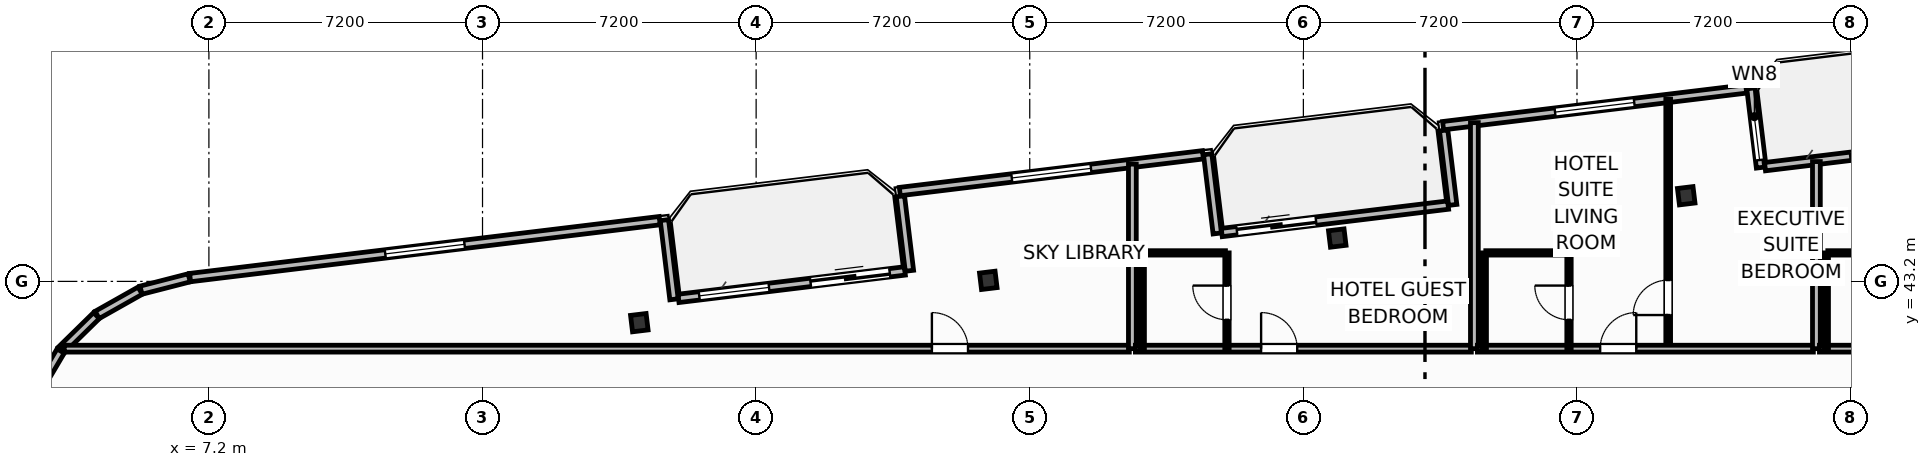
"""IFC4 building model, lengths in metres.
Left out: names, types, materials, properties, quantities, classifications, styles, units other than length and angle.
Written with IfcOpenShell. Run it as: python <this file> out.ifc"""

import sys

from ifc_helpers import new_model, si_unit, direction, frame, frame_2d, origin, origin_2d, place, context, subcontext, project, spatial, rectangle, i_section, extrude, element, fill, save


model = new_model("IFC4")
c1 = context("Model", 3, precision=1e-05, world=origin(), true_north=direction((0.0, 1.0)))
c2 = subcontext(c1, "Body", "Model", "MODEL_VIEW")
j1 = project(units=[si_unit("LENGTHUNIT", "METRE"), si_unit("PLANEANGLEUNIT", "RADIAN")], contexts=[c1])
p1 = place(None, origin())
s1 = spatial("IfcSite", under=j1, at=p1, CompositionType="ELEMENT")
p2 = place(p1, origin())
s2 = spatial("IfcBuilding", under=s1, at=p2, CompositionType="ELEMENT")
p3 = place(p2, frame((0.0, 0.0, 182.0)))
s3 = spatial("IfcBuildingStorey", under=s2, at=p3, CompositionType="ELEMENT", Elevation=182.0)
for number, where, z_axis, x_axis in (
    (1, (46.075, 45.454, 0.0), (0.0, 0.0, 1.0), (0.993, 0.12, 0.0)),
    (2, (36.892, 44.341, 0.0), (0.0, 0.0, 1.0), (0.993, 0.12, 0.0)),
    (3, (27.709, 43.227, 0.0), (0.0, 0.0, 1.0), (0.993, 0.12, 0.0)),
    (4, (18.526, 42.114, 0.0), (0.0, 0.0, 1.0), (0.993, 0.12, 0.0)),
):
    element("IfcColumn", number, at=place(p3, frame(where, z_axis=z_axis, x_axis=x_axis)), inside=s3, PredefinedType="COLUMN", context=c2, shape_type="SweptSolid", body=[
        extrude(i_section(OverallWidth=0.412, OverallDepth=0.435, WebThickness=0.036, FlangeThickness=0.057, FilletRadius=0.025, at=origin_2d()), origin(), (0.0, 0.0, 1.0), 3.7),
    ])
p4 = place(p3, frame((19.557, 42.753, 0.0), z_axis=(0.0, 0.0, 1.0), x_axis=(0.992729951822, 0.120362962556, 0.0)))
e5 = element("IfcWall", 5, at=p4, inside=s3, PredefinedType="SOLIDWALL", context=c2, shape_type="SweptSolid", body=[
    extrude(rectangle(XDim=6.0, YDim=0.22, at=frame_2d((3.0, 0.0))), origin(), (0.0, 0.0, 1.0), 2.73),
])
p5 = place(p4, frame((3.5, 0.0, 0.0)))
e6 = element("IfcOpeningElement", 6, at=p5, cuts=e5, PredefinedType="OPENING", context=c2, shape_type="SweptSolid", body=[
    extrude(rectangle(XDim=2.1, YDim=2.3, at=frame_2d((1.05, 1.15))), frame((0.0, 0.12, 0.0), z_axis=(0.0, -1.0, 0.0), x_axis=(1.0, 0.0, 0.0)), (0.0, 0.0, 1.0), 0.24),
])
p6 = place(p4, frame((0.55, 0.0, 0.75)))
e7 = element("IfcOpeningElement", 7, at=p6, cuts=e5, PredefinedType="OPENING", context=c2, shape_type="SweptSolid", body=[
    extrude(rectangle(XDim=1.85, YDim=1.75, at=frame_2d((0.925, 0.875))), frame((0.0, 0.12, 0.0), z_axis=(0.0, -1.0, 0.0), x_axis=(1.0, 0.0, 0.0)), (0.0, 0.0, 1.0), 0.24),
])
p7 = place(p3, frame((33.852, 44.486, 0.0), z_axis=(0.0, 0.0, 1.0), x_axis=(0.992729951822, 0.120362962556, 0.0)))
e8 = element("IfcWall", 8, at=p7, inside=s3, PredefinedType="SOLIDWALL", context=c2, shape_type="SweptSolid", body=[
    extrude(rectangle(XDim=6.0, YDim=0.22, at=frame_2d((3.0, 0.0))), origin(), (0.0, 0.0, 1.0), 2.73),
])
p8 = place(p7, frame((0.4, 0.0, 0.0)))
e9 = element("IfcOpeningElement", 9, at=p8, cuts=e8, PredefinedType="OPENING", context=c2, shape_type="SweptSolid", body=[
    extrude(rectangle(XDim=2.1, YDim=2.3, at=frame_2d((1.05, 1.15))), frame((0.0, 0.12, 0.0), z_axis=(0.0, -1.0, 0.0), x_axis=(1.0, 0.0, 0.0)), (0.0, 0.0, 1.0), 0.24),
])
p9 = place(p3, frame((48.148, 46.219, 0.0), z_axis=(0.0, 0.0, 1.0), x_axis=(0.992729951822, 0.120362962556, 0.0)))
e10 = element("IfcWall", 10, at=p9, inside=s3, PredefinedType="SOLIDWALL", context=c2, shape_type="SweptSolid", body=[
    extrude(rectangle(XDim=6.0, YDim=0.22, at=frame_2d((3.0, 0.0))), origin(), (0.0, 0.0, 1.0), 2.73),
])
p10 = place(p9, frame((2.26, 0.0, 0.0)))
e11 = element("IfcOpeningElement", 11, at=p10, cuts=e10, PredefinedType="OPENING", context=c2, shape_type="SweptSolid", body=[
    extrude(rectangle(XDim=2.1, YDim=2.3, at=frame_2d((1.05, 1.15))), frame((0.0, 0.12, 0.0), z_axis=(0.0, -1.0, 0.0), x_axis=(1.0, 0.0, 0.0)), (0.0, 0.0, 1.0), 0.24),
])
p11 = place(p3, frame((48.03, 46.194, 0.0), z_axis=(0.0, 0.0, 1.0), x_axis=(-0.120314009587, 0.992735885871, 0.0)))
e12 = element("IfcWall", 12, at=p11, inside=s3, PredefinedType="SOLIDWALL", context=c2, shape_type="SweptSolid", body=[
    extrude(rectangle(XDim=2.1, YDim=0.22, at=frame_2d((1.05, 0.0))), origin(), (0.0, 0.0, 1.0), 2.73),
])
p12 = place(p11, frame((0.2, 0.0, 0.8)))
e13 = element("IfcOpeningElement", 13, at=p12, cuts=e12, PredefinedType="OPENING", context=c2, shape_type="SweptSolid", body=[
    extrude(rectangle(XDim=1.15, YDim=1.4, at=frame_2d((0.575, 0.7))), frame((0.0, 0.12, 0.0), z_axis=(0.0, -1.0, 0.0), x_axis=(1.0, 0.0, 0.0)), (0.0, 0.0, 1.0), 0.24),
])
p13 = place(p3, frame((47.653, 48.264, 0.0), z_axis=(0.0, 0.0, 1.0), x_axis=(-0.992731032022, -0.120354052946, 0.0)))
e14 = element("IfcWall", 14, at=p13, inside=s3, PredefinedType="SOLIDWALL", context=c2, shape_type="SweptSolid", body=[
    extrude(rectangle(XDim=8.035, YDim=0.22, at=frame_2d((4.018, 0.0))), origin(), (0.0, 0.0, 1.0), 2.73),
])
p14 = place(p13, frame((2.968, 0.0, 0.8)))
e15 = element("IfcOpeningElement", 15, at=p14, cuts=e14, PredefinedType="OPENING", context=c2, shape_type="SweptSolid", body=[
    extrude(rectangle(XDim=2.1, YDim=1.75, at=frame_2d((1.05, 0.875))), frame((0.0, 0.12, 0.0), z_axis=(0.0, -1.0, 0.0), x_axis=(1.0, 0.0, 0.0)), (0.0, 0.0, 1.0), 0.24),
])
p15 = place(p3, frame((39.691, 47.173, 0.0), z_axis=(0.0, 0.0, 1.0), x_axis=(0.120397815541, -0.992725725472, 0.0)))
e16 = element("IfcWall", 16, at=p15, inside=s3, PredefinedType="SOLIDWALL", context=c2, shape_type="SweptSolid", body=[
    extrude(rectangle(XDim=1.975, YDim=0.22, at=frame_2d((0.988, 0.0))), origin(), (0.0, 0.0, 1.0), 2.73),
])
p16 = place(p3, frame((33.734, 44.461, 0.0), z_axis=(0.0, 0.0, 1.0), x_axis=(-0.120327895535, 0.992734202874, 0.0)))
e17 = element("IfcWall", 17, at=p16, inside=s3, PredefinedType="SOLIDWALL", context=c2, shape_type="SweptSolid", body=[
    extrude(rectangle(XDim=2.1, YDim=0.22, at=frame_2d((1.05, 0.0))), origin(), (0.0, 0.0, 1.0), 2.73),
])
p17 = place(p3, frame((33.357, 46.531, 0.0), z_axis=(0.0, 0.0, 1.0), x_axis=(-0.992731032022, -0.120354052946, 0.0)))
e18 = element("IfcWall", 18, at=p17, inside=s3, PredefinedType="SOLIDWALL", context=c2, shape_type="SweptSolid", body=[
    extrude(rectangle(XDim=8.035, YDim=0.22, at=frame_2d((4.018, 0.0))), origin(), (0.0, 0.0, 1.0), 2.73),
])
p18 = place(p17, frame((2.968, 0.0, 0.8)))
e19 = element("IfcOpeningElement", 19, at=p18, cuts=e18, PredefinedType="OPENING", context=c2, shape_type="SweptSolid", body=[
    extrude(rectangle(XDim=2.1, YDim=1.75, at=frame_2d((1.05, 0.875))), frame((0.0, 0.12, 0.0), z_axis=(0.0, -1.0, 0.0), x_axis=(1.0, 0.0, 0.0)), (0.0, 0.0, 1.0), 0.24),
])
p19 = place(p3, frame((25.396, 45.44, 0.0), z_axis=(0.0, 0.0, 1.0), x_axis=(0.120275992932, -0.992740492538, 0.0)))
e20 = element("IfcWall", 20, at=p19, inside=s3, PredefinedType="SOLIDWALL", context=c2, shape_type="SweptSolid", body=[
    extrude(rectangle(XDim=1.975, YDim=0.22, at=frame_2d((0.988, 0.0))), origin(), (0.0, 0.0, 1.0), 2.73),
])
p20 = place(p3, frame((19.439, 42.729, 0.0), z_axis=(0.0, 0.0, 1.0), x_axis=(-0.120327895535, 0.992734202874, 0.0)))
e21 = element("IfcWall", 21, at=p20, inside=s3, PredefinedType="SOLIDWALL", context=c2, shape_type="SweptSolid", body=[
    extrude(rectangle(XDim=2.1, YDim=0.22, at=frame_2d((1.05, 0.0))), origin(), (0.0, 0.0, 1.0), 2.73),
])
p21 = place(p3, frame((19.062, 44.798, 0.0), z_axis=(0.0, 0.0, 1.0), x_axis=(-0.992733569027, -0.120333124809, 0.0)))
e22 = element("IfcWall", 22, at=p21, inside=s3, PredefinedType="SOLIDWALL", context=c2, shape_type="SweptSolid", body=[
    extrude(rectangle(XDim=12.447, YDim=0.22, at=frame_2d((6.224, 0.0))), origin(), (0.0, 0.0, 1.0), 2.73),
])
p22 = place(p21, frame((5.174, 0.0, 0.8)))
e23 = element("IfcOpeningElement", 23, at=p22, cuts=e22, PredefinedType="OPENING", context=c2, shape_type="SweptSolid", body=[
    extrude(rectangle(XDim=2.1, YDim=1.75, at=frame_2d((1.05, 0.875))), frame((0.0, 0.12, 0.0), z_axis=(0.0, -1.0, 0.0), x_axis=(1.0, 0.0, 0.0)), (0.0, 0.0, 1.0), 0.24),
])
p23 = place(p3, frame((6.681, 43.294, 0.0), z_axis=(0.0, 0.0, 1.0), x_axis=(-0.968496788899, -0.2490260426, 0.0)))
e24 = element("IfcWall", 24, at=p23, inside=s3, PredefinedType="SOLIDWALL", context=c2, shape_type="SweptSolid", body=[
    extrude(rectangle(XDim=1.309, YDim=0.22, at=frame_2d((0.654, 0.0))), origin(), (0.0, 0.0, 1.0), 2.73),
])
for number, where, z_axis, x_axis in (
    (25, (5.392, 42.956, 0.0), (0.0, 0.0, 1.0), (-0.871, -0.491, 0.0)),
    (26, (4.241, 42.3, 0.0), (0.0, 0.0, 1.0), (-0.714, -0.7, 0.0)),
):
    element("IfcWall", number, at=place(p3, frame(where, z_axis=z_axis, x_axis=x_axis)), inside=s3, PredefinedType="SOLIDWALL", context=c2, shape_type="SweptSolid", body=[
        extrude(rectangle(XDim=1.301, YDim=0.22, at=frame_2d((0.65, 0.0))), origin(), (0.0, 0.0, 1.0), 2.73),
    ])
p24 = place(p3, frame((3.299, 41.368, 0.0), z_axis=(0.0, 0.0, 1.0), x_axis=(-0.508716668029, -0.860933999601, 0.0)))
e27 = element("IfcWall", 27, at=p24, inside=s3, PredefinedType="SOLIDWALL", context=c2, shape_type="SweptSolid", body=[
    extrude(rectangle(XDim=1.301, YDim=0.22, at=frame_2d((0.65, 0.0))), origin(), (0.0, 0.0, 1.0), 2.73),
])
p25 = place(p3, frame((3.393, 41.43, 0.0), z_axis=(0.0, 0.0, 1.0), x_axis=(1.0, 0.0, 0.0)))
e28 = element("IfcWall", 28, at=p25, inside=s3, PredefinedType="PARTITIONING", context=c2, shape_type="SweptSolid", body=[
    extrude(rectangle(XDim=28.027, YDim=0.18, at=frame_2d((14.013, 0.0))), origin(), (0.0, 0.0, 1.0), 2.662),
])
p26 = place(p25, frame((22.832, 0.0, 0.0)))
e29 = element("IfcOpeningElement", 29, at=p26, cuts=e28, PredefinedType="OPENING", context=c2, shape_type="SweptSolid", body=[
    extrude(rectangle(XDim=0.95, YDim=2.05, at=frame_2d((0.475, 1.025))), frame((0.0, 0.1, 0.0), z_axis=(0.0, -1.0, 0.0), x_axis=(1.0, 0.0, 0.0)), (0.0, 0.0, 1.0), 0.2),
])
p27 = place(p3, frame((31.5, 41.43, 0.0), z_axis=(0.0, 0.0, 1.0), x_axis=(0.0, 1.0, 0.0)))
e30 = element("IfcWall", 30, at=p27, inside=s3, PredefinedType="PARTITIONING", context=c2, shape_type="SweptSolid", body=[
    extrude(rectangle(XDim=4.856, YDim=0.205, at=frame_2d((2.428, 0.0))), origin(), (0.0, 0.0, 1.0), 3.45),
])
p28 = place(p3, frame((31.58, 41.43, 0.0), z_axis=(0.0, 0.0, 1.0), x_axis=(1.0, 0.0, 0.0)))
e31 = element("IfcWall", 31, at=p28, inside=s3, PredefinedType="PARTITIONING", context=c2, shape_type="SweptSolid", body=[
    extrude(rectangle(XDim=8.84, YDim=0.18, at=frame_2d((4.42, 0.0))), origin(), (0.0, 0.0, 1.0), 3.45),
])
p29 = place(p28, frame((3.308, 0.0, 0.0)))
e32 = element("IfcOpeningElement", 32, at=p29, cuts=e31, PredefinedType="OPENING", context=c2, shape_type="SweptSolid", body=[
    extrude(rectangle(XDim=0.95, YDim=2.15, at=frame_2d((0.475, 1.075))), frame((0.0, 0.1, 0.0), z_axis=(0.0, -1.0, 0.0), x_axis=(1.0, 0.0, 0.0)), (0.0, 0.0, 1.0), 0.2),
])
p30 = place(p3, frame((31.8, 43.95, 0.0), z_axis=(0.0, 0.0, 1.0), x_axis=(1.0, 0.0, 0.0)))
e33 = element("IfcWall", 33, at=p30, inside=s3, PredefinedType="PARTITIONING", context=c2, shape_type="SweptSolid", body=[
    extrude(rectangle(XDim=2.15, YDim=0.115, at=frame_2d((1.075, 0.0))), origin(), (0.0, 0.0, 1.0), 2.824),
])
p31 = place(p3, frame((33.99, 41.43, 0.0), z_axis=(0.0, 0.0, 1.0), x_axis=(0.0, 1.0, 0.0)))
e34 = element("IfcWall", 34, at=p31, inside=s3, PredefinedType="PARTITIONING", context=c2, shape_type="SweptSolid", body=[
    extrude(rectangle(XDim=2.52, YDim=0.115, at=frame_2d((1.26, 0.0))), origin(), (0.0, 0.0, 1.0), 3.45),
])
p32 = place(p31, frame((0.76, 0.0, 0.0)))
e35 = element("IfcOpeningElement", 35, at=p32, cuts=e34, PredefinedType="OPENING", context=c2, shape_type="SweptSolid", body=[
    extrude(rectangle(XDim=0.9, YDim=2.05, at=frame_2d((0.45, 1.025))), frame((0.0, 0.067, 0.0), z_axis=(0.0, -1.0, 0.0), x_axis=(1.0, 0.0, 0.0)), (0.0, 0.0, 1.0), 0.135),
])
p33 = place(p3, frame((31.76, 41.43, 0.0), z_axis=(0.0, 0.0, 1.0), x_axis=(0.0, 1.0, 0.0)))
e36 = element("IfcWall", 36, at=p33, inside=s3, PredefinedType="PARTITIONING", context=c2, shape_type="SweptSolid", body=[
    extrude(rectangle(XDim=2.52, YDim=0.115, at=frame_2d((1.26, 0.0))), origin(), (0.0, 0.0, 1.0), 3.45),
])
p34 = place(p3, frame((40.5, 41.43, 0.0), z_axis=(0.0, 0.0, 1.0), x_axis=(0.0, 1.0, 0.0)))
e37 = element("IfcWall", 37, at=p34, inside=s3, PredefinedType="PARTITIONING", context=c2, shape_type="SweptSolid", body=[
    extrude(rectangle(XDim=5.947, YDim=0.205, at=frame_2d((2.974, 0.0))), origin(), (0.0, 0.0, 1.0), 3.45),
])
p35 = place(p3, frame((45.6, 41.43, 0.0), z_axis=(0.0, 0.0, 1.0), x_axis=(0.0, 1.0, 0.0)))
e38 = element("IfcWall", 38, at=p35, inside=s3, PredefinedType="PARTITIONING", context=c2, shape_type="SweptSolid", body=[
    extrude(rectangle(XDim=6.565, YDim=0.125, at=frame_2d((3.283, 0.0))), origin(), (0.0, 0.0, 1.0), 3.45),
])
p36 = place(p35, frame((0.885, 0.0, 0.0)))
e39 = element("IfcOpeningElement", 39, at=p36, cuts=e38, PredefinedType="OPENING", context=c2, shape_type="SweptSolid", body=[
    extrude(rectangle(XDim=0.92, YDim=2.05, at=frame_2d((0.46, 1.025))), frame((0.0, 0.073, 0.0), z_axis=(0.0, -1.0, 0.0), x_axis=(1.0, 0.0, 0.0)), (0.0, 0.0, 1.0), 0.145),
])
p37 = place(p3, frame((40.58, 41.43, 0.0), z_axis=(0.0, 0.0, 1.0), x_axis=(1.0, 0.0, 0.0)))
e40 = element("IfcWall", 40, at=p37, inside=s3, PredefinedType="PARTITIONING", context=c2, shape_type="SweptSolid", body=[
    extrude(rectangle(XDim=8.84, YDim=0.18, at=frame_2d((4.42, 0.0))), origin(), (0.0, 0.0, 1.0), 3.45),
])
p38 = place(p37, frame((3.23, 0.0, 0.0)))
e41 = element("IfcOpeningElement", 41, at=p38, cuts=e40, PredefinedType="OPENING", context=c2, shape_type="SweptSolid", body=[
    extrude(rectangle(XDim=0.95, YDim=2.15, at=frame_2d((0.475, 1.075))), frame((0.0, 0.1, 0.0), z_axis=(0.0, -1.0, 0.0), x_axis=(1.0, 0.0, 0.0)), (0.0, 0.0, 1.0), 0.2),
])
p39 = place(p3, frame((40.8, 43.95, 0.0), z_axis=(0.0, 0.0, 1.0), x_axis=(1.0, 0.0, 0.0)))
e42 = element("IfcWall", 42, at=p39, inside=s3, PredefinedType="PARTITIONING", context=c2, shape_type="SweptSolid", body=[
    extrude(rectangle(XDim=2.15, YDim=0.115, at=frame_2d((1.075, 0.0))), origin(), (0.0, 0.0, 1.0), 3.45),
])
p40 = place(p3, frame((42.99, 41.43, 0.0), z_axis=(0.0, 0.0, 1.0), x_axis=(0.0, 1.0, 0.0)))
e43 = element("IfcWall", 43, at=p40, inside=s3, PredefinedType="PARTITIONING", context=c2, shape_type="SweptSolid", body=[
    extrude(rectangle(XDim=2.52, YDim=0.115, at=frame_2d((1.26, 0.0))), origin(), (0.0, 0.0, 1.0), 3.45),
])
p41 = place(p40, frame((0.76, 0.0, 0.0)))
e44 = element("IfcOpeningElement", 44, at=p41, cuts=e43, PredefinedType="OPENING", context=c2, shape_type="SweptSolid", body=[
    extrude(rectangle(XDim=0.9, YDim=2.05, at=frame_2d((0.45, 1.025))), frame((0.0, 0.067, 0.0), z_axis=(0.0, -1.0, 0.0), x_axis=(1.0, 0.0, 0.0)), (0.0, 0.0, 1.0), 0.135),
])
p42 = place(p3, frame((40.76, 41.43, 0.0), z_axis=(0.0, 0.0, 1.0), x_axis=(0.0, 1.0, 0.0)))
e45 = element("IfcWall", 45, at=p42, inside=s3, PredefinedType="PARTITIONING", context=c2, shape_type="SweptSolid", body=[
    extrude(rectangle(XDim=2.52, YDim=0.115, at=frame_2d((1.26, 0.0))), origin(), (0.0, 0.0, 1.0), 3.45),
])
p43 = place(p3, frame((49.5, 41.43, 0.0), z_axis=(0.0, 0.0, 1.0), x_axis=(0.0, 1.0, 0.0)))
e46 = element("IfcWall", 46, at=p43, inside=s3, PredefinedType="PARTITIONING", context=c2, shape_type="SweptSolid", body=[
    extrude(rectangle(XDim=4.923, YDim=0.205, at=frame_2d((2.461, 0.0))), origin(), (0.0, 0.0, 1.0), 3.45),
])
p44 = place(p3, frame((49.58, 41.43, 0.0), z_axis=(0.0, 0.0, 1.0), x_axis=(1.0, 0.0, 0.0)))
e47 = element("IfcWall", 47, at=p44, inside=s3, PredefinedType="PARTITIONING", context=c2, shape_type="SweptSolid", body=[
    extrude(rectangle(XDim=23.042, YDim=0.18, at=frame_2d((11.521, 0.0))), origin(), (0.0, 0.0, 1.0), 3.45),
])
p45 = place(p44, frame((3.317, 0.0, 0.0)))
e48 = element("IfcOpeningElement", 48, at=p45, cuts=e47, PredefinedType="OPENING", context=c2, shape_type="SweptSolid", body=[
    extrude(rectangle(XDim=0.95, YDim=2.15, at=frame_2d((0.475, 1.075))), frame((0.0, 0.1, 0.0), z_axis=(0.0, -1.0, 0.0), x_axis=(1.0, 0.0, 0.0)), (0.0, 0.0, 1.0), 0.2),
])
p46 = place(p3, frame((49.8, 43.95, 0.0), z_axis=(0.0, 0.0, 1.0), x_axis=(1.0, 0.0, 0.0)))
e49 = element("IfcWall", 49, at=p46, inside=s3, PredefinedType="PARTITIONING", context=c2, shape_type="SweptSolid", body=[
    extrude(rectangle(XDim=2.15, YDim=0.115, at=frame_2d((1.075, 0.0))), origin(), (0.0, 0.0, 1.0), 3.45),
])
p47 = place(p3, frame((49.76, 41.43, 0.0), z_axis=(0.0, 0.0, 1.0), x_axis=(0.0, 1.0, 0.0)))
e50 = element("IfcWall", 50, at=p47, inside=s3, PredefinedType="PARTITIONING", context=c2, shape_type="SweptSolid", body=[
    extrude(rectangle(XDim=2.52, YDim=0.115, at=frame_2d((1.26, 0.0))), origin(), (0.0, 0.0, 1.0), 3.45),
])
p48 = place(p5, origin())
e51 = element("IfcDoor", 51, at=p48, inside=s3, OperationType="SLIDING_TO_LEFT", PredefinedType="DOOR", context=c2, shape_type="SweptSolid", body=[
    extrude(rectangle(XDim=2.1, YDim=2.3, at=frame_2d((1.05, 1.15))), frame((0.0, 0.025, 0.0), z_axis=(0.0, -1.0, 0.0), x_axis=(1.0, 0.0, 0.0)), (0.0, 0.0, 1.0), 0.05),
])
fill(e6, e51)
p49 = place(p6, origin())
e52 = element("IfcWindow", 52, at=p49, inside=s3, PartitioningType="SINGLE_PANEL", PredefinedType="WINDOW", context=c2, shape_type="SweptSolid", body=[
    extrude(rectangle(XDim=1.85, YDim=1.75, at=frame_2d((0.925, 0.875))), frame((0.0, 0.03, 0.0), z_axis=(0.0, -1.0, 0.0), x_axis=(1.0, 0.0, 0.0)), (0.0, 0.0, 1.0), 0.06),
])
fill(e7, e52)
p50 = place(p8, origin())
e53 = element("IfcDoor", 53, at=p50, inside=s3, OperationType="SLIDING_TO_LEFT", PredefinedType="DOOR", context=c2, shape_type="SweptSolid", body=[
    extrude(rectangle(XDim=2.1, YDim=2.3, at=frame_2d((1.05, 1.15))), frame((0.0, 0.025, 0.0), z_axis=(0.0, -1.0, 0.0), x_axis=(1.0, 0.0, 0.0)), (0.0, 0.0, 1.0), 0.05),
])
fill(e9, e53)
p51 = place(p10, origin())
e54 = element("IfcDoor", 54, at=p51, inside=s3, OperationType="SLIDING_TO_LEFT", PredefinedType="DOOR", context=c2, shape_type="SweptSolid", body=[
    extrude(rectangle(XDim=2.1, YDim=2.3, at=frame_2d((1.05, 1.15))), frame((0.0, 0.025, 0.0), z_axis=(0.0, -1.0, 0.0), x_axis=(1.0, 0.0, 0.0)), (0.0, 0.0, 1.0), 0.05),
])
fill(e11, e54)
p52 = place(p14, origin())
e55 = element("IfcWindow", 55, at=p52, inside=s3, PartitioningType="SINGLE_PANEL", PredefinedType="WINDOW", context=c2, shape_type="SweptSolid", body=[
    extrude(rectangle(XDim=2.1, YDim=1.75, at=frame_2d((1.05, 0.875))), frame((0.0, 0.03, 0.0), z_axis=(0.0, -1.0, 0.0), x_axis=(1.0, 0.0, 0.0)), (0.0, 0.0, 1.0), 0.06),
])
fill(e15, e55)
p53 = place(p18, origin())
e56 = element("IfcWindow", 56, at=p53, inside=s3, PartitioningType="SINGLE_PANEL", PredefinedType="WINDOW", context=c2, shape_type="SweptSolid", body=[
    extrude(rectangle(XDim=2.1, YDim=1.75, at=frame_2d((1.05, 0.875))), frame((0.0, 0.03, 0.0), z_axis=(0.0, -1.0, 0.0), x_axis=(1.0, 0.0, 0.0)), (0.0, 0.0, 1.0), 0.06),
])
fill(e19, e56)
p54 = place(p22, origin())
e57 = element("IfcWindow", 57, at=p54, inside=s3, PartitioningType="SINGLE_PANEL", PredefinedType="WINDOW", context=c2, shape_type="SweptSolid", body=[
    extrude(rectangle(XDim=2.1, YDim=1.75, at=frame_2d((1.05, 0.875))), frame((0.0, 0.03, 0.0), z_axis=(0.0, -1.0, 0.0), x_axis=(1.0, 0.0, 0.0)), (0.0, 0.0, 1.0), 0.06),
])
fill(e23, e57)
p55 = place(p26, origin())
e58 = element("IfcDoor", 58, at=p55, inside=s3, OperationType="SINGLE_SWING_LEFT", PredefinedType="DOOR", context=c2, shape_type="SweptSolid", body=[
    extrude(rectangle(XDim=0.95, YDim=2.05, at=frame_2d((0.475, 1.025))), frame((0.0, 0.025, 0.0), z_axis=(0.0, -1.0, 0.0), x_axis=(1.0, 0.0, 0.0)), (0.0, 0.0, 1.0), 0.05),
])
fill(e29, e58)
p56 = place(p29, origin())
e59 = element("IfcDoor", 59, at=p56, inside=s3, OperationType="SINGLE_SWING_LEFT", PredefinedType="DOOR", context=c2, shape_type="SweptSolid", body=[
    extrude(rectangle(XDim=0.95, YDim=2.15, at=frame_2d((0.475, 1.075))), frame((0.0, 0.025, 0.0), z_axis=(0.0, -1.0, 0.0), x_axis=(1.0, 0.0, 0.0)), (0.0, 0.0, 1.0), 0.05),
])
fill(e32, e59)
p57 = place(p32, origin())
e60 = element("IfcDoor", 60, at=p57, inside=s3, OperationType="SINGLE_SWING_RIGHT", PredefinedType="DOOR", context=c2, shape_type="SweptSolid", body=[
    extrude(rectangle(XDim=0.9, YDim=2.05, at=frame_2d((0.45, 1.025))), frame((0.0, 0.025, 0.0), z_axis=(0.0, -1.0, 0.0), x_axis=(1.0, 0.0, 0.0)), (0.0, 0.0, 1.0), 0.05),
])
fill(e35, e60)
p58 = place(p36, origin())
e61 = element("IfcDoor", 61, at=p58, inside=s3, OperationType="SINGLE_SWING_LEFT", PredefinedType="DOOR", context=c2, shape_type="SweptSolid", body=[
    extrude(rectangle(XDim=0.92, YDim=2.05, at=frame_2d((0.46, 1.025))), frame((0.0, 0.025, 0.0), z_axis=(0.0, -1.0, 0.0), x_axis=(1.0, 0.0, 0.0)), (0.0, 0.0, 1.0), 0.05),
])
fill(e39, e61)
p59 = place(p38, origin())
e62 = element("IfcDoor", 62, at=p59, inside=s3, OperationType="SINGLE_SWING_RIGHT", PredefinedType="DOOR", context=c2, shape_type="SweptSolid", body=[
    extrude(rectangle(XDim=0.95, YDim=2.15, at=frame_2d((0.475, 1.075))), frame((0.0, 0.025, 0.0), z_axis=(0.0, -1.0, 0.0), x_axis=(1.0, 0.0, 0.0)), (0.0, 0.0, 1.0), 0.05),
])
fill(e41, e62)
p60 = place(p41, origin())
e63 = element("IfcDoor", 63, at=p60, inside=s3, OperationType="SINGLE_SWING_RIGHT", PredefinedType="DOOR", context=c2, shape_type="SweptSolid", body=[
    extrude(rectangle(XDim=0.9, YDim=2.05, at=frame_2d((0.45, 1.025))), frame((0.0, 0.025, 0.0), z_axis=(0.0, -1.0, 0.0), x_axis=(1.0, 0.0, 0.0)), (0.0, 0.0, 1.0), 0.05),
])
fill(e44, e63)
p61 = place(p12, origin())
e64 = element("IfcWindow", 64, at=p61, inside=s3, PartitioningType="SINGLE_PANEL", PredefinedType="WINDOW", context=c2, shape_type="SweptSolid", body=[
    extrude(rectangle(XDim=1.15, YDim=1.4, at=frame_2d((0.575, 0.7))), frame((0.0, 0.03, 0.0), z_axis=(0.0, -1.0, 0.0), x_axis=(1.0, 0.0, 0.0)), (0.0, 0.0, 1.0), 0.06),
])
fill(e13, e64)
save(model, sys.argv[1])
